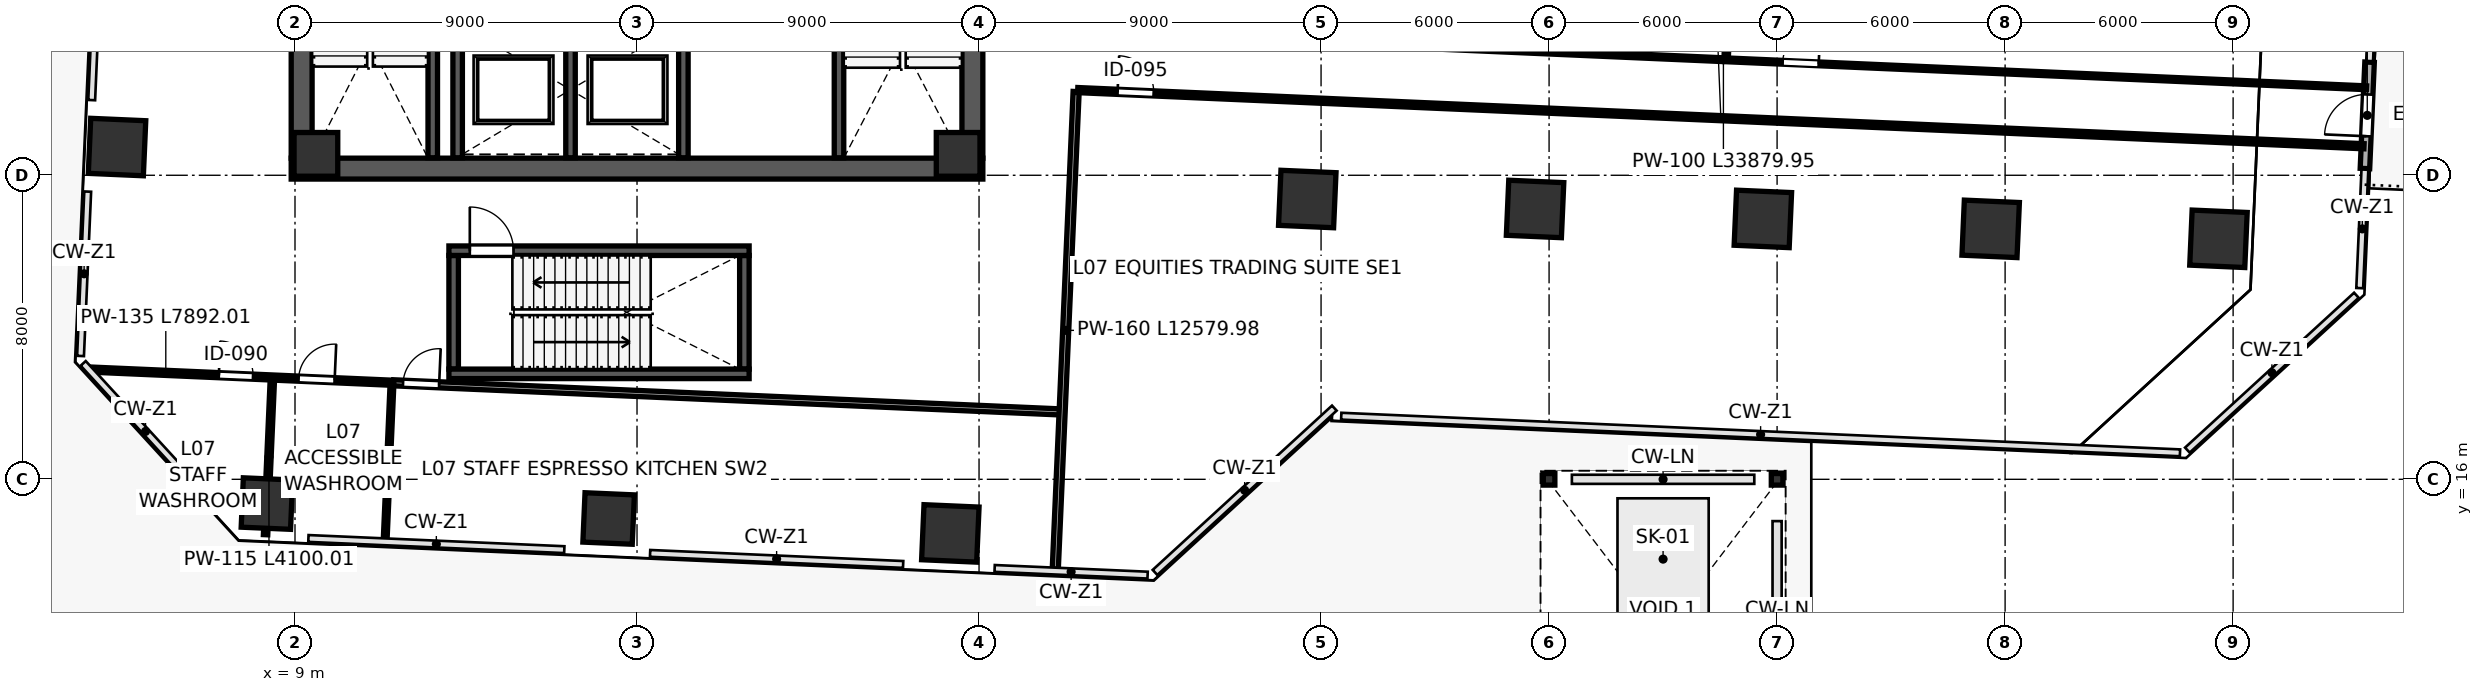
"""IFC4 building model, lengths in metres.
Left out: names, types, materials, properties, quantities, classifications, styles, units other than length and angle.
Written with IfcOpenShell. Run it as: python <this file> out.ifc"""

import sys

from ifc_helpers import new_model, si_unit, direction, frame, frame_2d, origin, origin_2d, place, context, subcontext, project, spatial, rectangle, hollow_rectangle, extrude, source, transform, mapped, element, fill, save


model = new_model("IFC4")
c1 = context("Model", 3, precision=1e-05, world=origin(), true_north=direction((0.0, 1.0)))
c2 = subcontext(c1, "Body", "Model", "MODEL_VIEW")
j1 = project(units=[si_unit("LENGTHUNIT", "METRE"), si_unit("PLANEANGLEUNIT", "RADIAN")], contexts=[c1])
p1 = place(None, origin())
s1 = spatial("IfcSite", under=j1, at=p1, CompositionType="ELEMENT")
p2 = place(p1, origin())
s2 = spatial("IfcBuilding", under=s1, at=p2, CompositionType="ELEMENT")
p3 = place(p2, frame((0.0, 0.0, 32.8)))
s3 = spatial("IfcBuildingStorey", under=s2, at=p3, CompositionType="ELEMENT", Elevation=32.8)
m1 = source(origin(), c2, "Body", "SweptSolid", [
    extrude(rectangle(XDim=1.15, YDim=1.15, at=origin_2d()), origin(), (0.0, 0.0, 1.0), 4.799),
])
for number, where, z_axis, x_axis in (
    (1, (9.55, 24.55, 0.001), (0.0, 0.0, 1.0), (1.0, 0.0, 0.0)),
    (2, (26.45, 24.55, 0.001), (0.0, 0.0, 1.0), (1.0, 0.0, 0.0)),
):
    element("IfcColumn", number, at=place(p3, frame(where, z_axis=z_axis, x_axis=x_axis)), inside=s3, PredefinedType="COLUMN", context=c2, shape_type="MappedRepresentation", body=[
        mapped(m1, transform((0.0, 0.0, 0.0), scale=1.0)),
    ])
m2 = source(origin(), c2, "Body", "SweptSolid", [
    extrude(rectangle(XDim=1.3, YDim=1.3, at=origin_2d()), origin(), (0.0, 0.0, 1.0), 4.799),
])
for number, where, z_axis, x_axis in (
    (3, (8.262, 15.362, 0.001), (0.0, 0.0, 1.0), (-0.999, 0.044, 0.0)),
    (4, (17.253, 14.969, 0.001), (0.0, 0.0, 1.0), (-0.999, 0.044, 0.0)),
):
    element("IfcColumn", number, at=place(p3, frame(where, z_axis=z_axis, x_axis=x_axis)), inside=s3, PredefinedType="COLUMN", context=c2, shape_type="MappedRepresentation", body=[
        mapped(m2, transform((0.0, 0.0, 0.0), scale=1.0)),
    ])
m3 = source(origin(), c2, "Body", "SweptSolid", [
    extrude(rectangle(XDim=1.45, YDim=1.45, at=origin_2d()), origin(), (0.0, 0.0, 1.0), 4.799),
])
p4 = place(p3, frame((26.244, 14.576, 0.001), z_axis=(0.0, 0.0, 1.0), x_axis=(-0.999048221582, 0.043619387365, 0.0)))
e5 = element("IfcColumn", 5, at=p4, inside=s3, PredefinedType="COLUMN", context=c2, shape_type="MappedRepresentation", body=[
    mapped(m3, transform((0.0, 0.0, 0.0), scale=1.0)),
])
m4 = source(origin(), c2, "Body", "SweptSolid", [
    extrude(rectangle(XDim=1.45, YDim=1.45, at=origin_2d()), origin(), (0.0, 0.0, 1.0), 4.799),
])
for number, where, z_axis, x_axis in (
    (6, (35.637, 23.375, 0.001), (0.0, 0.0, 1.0), (-0.999, 0.044, 0.0)),
    (7, (41.632, 23.113, 0.001), (0.0, 0.0, 1.0), (-0.999, 0.044, 0.0)),
    (8, (47.626, 22.852, 0.001), (0.0, 0.0, 1.0), (-0.999, 0.044, 0.0)),
    (9, (53.62, 22.59, 0.001), (0.0, 0.0, 1.0), (-0.999, 0.044, 0.0)),
):
    element("IfcColumn", number, at=place(p3, frame(where, z_axis=z_axis, x_axis=x_axis)), inside=s3, PredefinedType="COLUMN", context=c2, shape_type="MappedRepresentation", body=[
        mapped(m4, transform((0.0, 0.0, 0.0), scale=1.0)),
    ])
for number, where, z_axis, x_axis in (
    (10, (59.615, 22.328, 0.001), (0.0, 0.0, 1.0), (-0.999, 0.044, 0.0)),
    (11, (4.317, 24.743, 0.001), (0.0, 0.0, 1.0), (-0.999, 0.044, 0.0)),
):
    element("IfcColumn", number, at=place(p3, frame(where, z_axis=z_axis, x_axis=x_axis)), inside=s3, PredefinedType="COLUMN", context=c2, shape_type="MappedRepresentation", body=[
        mapped(m3, transform((0.0, 0.0, 0.0), scale=1.0)),
    ])
m5 = source(origin(), c2, "Body", "SweptSolid", [
    extrude(hollow_rectangle(XDim=0.305, YDim=0.305, WallThickness=0.016, InnerFilletRadius=0.016, OuterFilletRadius=0.032, at=origin_2d()), origin(), (0.0, 0.0, 1.0), 3.999),
])
for number, where, z_axis, x_axis in (
    (12, (48.0, 16.0, 0.001), (0.0, 0.0, 1.0), (1.0, 0.0, 0.0)),
    (13, (42.0, 16.0, 0.001), (0.0, 0.0, 1.0), (1.0, 0.0, 0.0)),
):
    element("IfcColumn", number, at=place(p3, frame(where, z_axis=z_axis, x_axis=x_axis)), inside=s3, PredefinedType="USERDEFINED", context=c2, shape_type="MappedRepresentation", body=[
        mapped(m5, transform((0.0, 0.0, 0.0), scale=1.0)),
    ])
p5 = place(p3, frame((63.469, 24.178, 0.0), z_axis=(0.0, 0.0, 1.0), x_axis=(0.04359614401, 0.999049236138, 0.0)))
e14 = element("IfcWall", 14, at=p5, inside=s3, PredefinedType="SOLIDWALL", context=c2, shape_type="SweptSolid", body=[
    extrude(rectangle(XDim=2.8, YDim=0.25, at=frame_2d((1.4, 0.0))), origin(), (0.0, 0.0, 1.0), 4.56),
])
p6 = place(p5, frame((0.85, 0.0, 0.0)))
e15 = element("IfcOpeningElement", 15, at=p6, cuts=e14, PredefinedType="OPENING", context=c2, shape_type="SweptSolid", body=[
    extrude(rectangle(XDim=1.1, YDim=2.2, at=frame_2d((0.55, 1.1))), frame((0.0, 0.135, 0.0), z_axis=(0.0, -1.0, 0.0), x_axis=(1.0, 0.0, 0.0)), (0.0, 0.0, 1.0), 0.27),
])
p7 = place(p3, frame((9.175, 24.45, 0.0), z_axis=(0.0, 0.0, 1.0), x_axis=(0.0, 1.0, 0.0)))
e16 = element("IfcWall", 16, at=p7, inside=s3, PredefinedType="SHEAR", context=c2, shape_type="SweptSolid", body=[
    extrude(rectangle(XDim=15.1, YDim=0.55, at=frame_2d((7.55, 0.0))), origin(), (0.0, 0.0, 1.0), 4.56),
])
p8 = place(p3, frame((26.825, 24.45, 0.0), z_axis=(0.0, 0.0, 1.0), x_axis=(0.0, 1.0, 0.0)))
e17 = element("IfcWall", 17, at=p8, inside=s3, PredefinedType="SHEAR", context=c2, shape_type="SweptSolid", body=[
    extrude(rectangle(XDim=15.1, YDim=0.55, at=frame_2d((7.55, 0.0))), origin(), (0.0, 0.0, 1.0), 4.56),
])
p9 = place(p8, frame((8.6, 0.0, 0.0)))
e18 = element("IfcOpeningElement", 18, at=p9, cuts=e17, PredefinedType="OPENING", context=c2, shape_type="SweptSolid", body=[
    extrude(rectangle(XDim=1.15, YDim=2.2, at=frame_2d((0.575, 1.1))), frame((0.0, 0.285, 0.0), z_axis=(0.0, -1.0, 0.0), x_axis=(1.0, 0.0, 0.0)), (0.0, 0.0, 1.0), 0.57),
])
p10 = place(p3, frame((8.9, 24.175, 0.0), z_axis=(0.0, 0.0, 1.0), x_axis=(1.0, 0.0, 0.0)))
e19 = element("IfcWall", 19, at=p10, inside=s3, PredefinedType="SHEAR", context=c2, shape_type="SweptSolid", body=[
    extrude(rectangle(XDim=18.2, YDim=0.55, at=frame_2d((9.1, 0.0))), origin(), (0.0, 0.0, 1.0), 4.56),
])
p11 = place(p3, frame((12.625, 24.46, 0.0), z_axis=(0.0, 0.0, 1.0), x_axis=(0.0, 1.0, 0.0)))
e20 = element("IfcWall", 20, at=p11, inside=s3, PredefinedType="SHEAR", context=c2, shape_type="SweptSolid", body=[
    extrude(rectangle(XDim=7.49, YDim=0.25, at=frame_2d((3.745, 0.0))), origin(), (0.0, 0.0, 1.0), 4.56),
])
p12 = place(p11, frame((5.85, 0.0, 0.0)))
e21 = element("IfcOpeningElement", 21, at=p12, cuts=e20, PredefinedType="OPENING", context=c2, shape_type="SweptSolid", body=[
    extrude(rectangle(XDim=1.15, YDim=2.2, at=frame_2d((0.575, 1.1))), frame((0.0, 0.135, 0.0), z_axis=(0.0, -1.0, 0.0), x_axis=(1.0, 0.0, 0.0)), (0.0, 0.0, 1.0), 0.27),
])
p13 = place(p3, frame((23.315, 24.46, 0.0), z_axis=(0.0, 0.0, 1.0), x_axis=(0.0, 1.0, 0.0)))
e22 = element("IfcWall", 22, at=p13, inside=s3, PredefinedType="SHEAR", context=c2, shape_type="SweptSolid", body=[
    extrude(rectangle(XDim=7.49, YDim=0.25, at=frame_2d((3.745, 0.0))), origin(), (0.0, 0.0, 1.0), 4.56),
])
for number, where, z_axis, x_axis in (
    (23, (13.28, 24.46, 0.0), (0.0, 0.0, 1.0), (0.0, 1.0, 0.0)),
    (24, (16.25, 24.46, 0.0), (0.0, 0.0, 1.0), (0.0, 1.0, 0.0)),
    (25, (19.22, 24.46, 0.0), (0.0, 0.0, 1.0), (0.0, 1.0, 0.0)),
):
    element("IfcWall", number, at=place(p3, frame(where, z_axis=z_axis, x_axis=x_axis)), inside=s3, PredefinedType="SHEAR", context=c2, shape_type="SweptSolid", body=[
        extrude(rectangle(XDim=3.49, YDim=0.25, at=frame_2d((1.745, 0.0))), origin(), (0.0, 0.0, 1.0), 4.56),
    ])
for number, where, z_axis, x_axis in (
    (26, (13.175, 18.9, 0.0), (0.0, 0.0, 1.0), (0.0, 1.0, 0.0)),
    (27, (20.825, 18.9, 0.0), (0.0, 0.0, 1.0), (0.0, 1.0, 0.0)),
):
    element("IfcWall", number, at=place(p3, frame(where, z_axis=z_axis, x_axis=x_axis)), inside=s3, PredefinedType="SHEAR", context=c2, shape_type="SweptSolid", body=[
        extrude(rectangle(XDim=2.99, YDim=0.25, at=frame_2d((1.495, 0.0))), origin(), (0.0, 0.0, 1.0), 4.56),
    ])
p14 = place(p3, frame((13.05, 18.775, 0.0), z_axis=(0.0, 0.0, 1.0), x_axis=(1.0, 0.0, 0.0)))
e28 = element("IfcWall", 28, at=p14, inside=s3, PredefinedType="SHEAR", context=c2, shape_type="SweptSolid", body=[
    extrude(rectangle(XDim=7.9, YDim=0.25, at=frame_2d((3.95, 0.0))), origin(), (0.0, 0.0, 1.0), 4.56),
])
p15 = place(p3, frame((13.05, 22.015, 0.0), z_axis=(0.0, 0.0, 1.0), x_axis=(1.0, 0.0, 0.0)))
e29 = element("IfcWall", 29, at=p15, inside=s3, PredefinedType="SHEAR", context=c2, shape_type="SweptSolid", body=[
    extrude(rectangle(XDim=7.9, YDim=0.25, at=frame_2d((3.95, 0.0))), origin(), (0.0, 0.0, 1.0), 4.56),
])
p16 = place(p15, frame((0.55, 0.0, 0.0)))
e30 = element("IfcOpeningElement", 30, at=p16, cuts=e29, PredefinedType="OPENING", context=c2, shape_type="SweptSolid", body=[
    extrude(rectangle(XDim=1.15, YDim=2.2, at=frame_2d((0.575, 1.1))), frame((0.0, 0.135, 0.0), z_axis=(0.0, -1.0, 0.0), x_axis=(1.0, 0.0, 0.0)), (0.0, 0.0, 1.0), 0.27),
])
p17 = place(p3, frame((8.226, 14.542, 0.0), z_axis=(0.0, 0.0, 1.0), x_axis=(0.043649126443, 0.999046922702, 0.0)))
e31 = element("IfcWall", 31, at=p17, inside=s3, PredefinedType="PARTITIONING", context=c2, shape_type="SweptSolid", body=[
    extrude(rectangle(XDim=4.1, YDim=0.115, at=frame_2d((2.05, 0.0))), origin(), (0.0, 0.0, 1.0), 3.695),
])
p18 = place(p3, frame((11.373, 14.405, 0.0), z_axis=(0.0, 0.0, 1.0), x_axis=(0.04364652983, 0.999047036147, 0.0)))
e32 = element("IfcWall", 32, at=p18, inside=s3, PredefinedType="PARTITIONING", context=c2, shape_type="SweptSolid", body=[
    extrude(rectangle(XDim=4.1, YDim=0.1, at=frame_2d((2.05, 0.0))), origin(), (0.0, 0.0, 1.0), 3.695),
])
p19 = place(p3, frame((3.629, 18.887, 0.0), z_axis=(0.0, 0.0, 1.0), x_axis=(0.999046913697, -0.043649332566, 0.0)))
e33 = element("IfcWall", 33, at=p19, inside=s3, PredefinedType="PARTITIONING", context=c2, shape_type="SweptSolid", body=[
    extrude(rectangle(XDim=7.892, YDim=0.135, at=frame_2d((3.946, 0.0))), origin(), (0.0, 0.0, 1.0), 4.56),
])
p20 = place(p19, frame((3.37, 0.0, 0.0)))
e34 = element("IfcOpeningElement", 34, at=p20, cuts=e33, PredefinedType="OPENING", context=c2, shape_type="SweptSolid", body=[
    extrude(rectangle(XDim=0.9, YDim=2.15, at=frame_2d((0.45, 1.075))), frame((0.0, 0.078, 0.0), z_axis=(0.0, -1.0, 0.0), x_axis=(1.0, 0.0, 0.0)), (0.0, 0.0, 1.0), 0.155),
])
p21 = place(p19, frame((5.47, 0.0, 0.0)))
e35 = element("IfcOpeningElement", 35, at=p21, cuts=e33, PredefinedType="OPENING", context=c2, shape_type="SweptSolid", body=[
    extrude(rectangle(XDim=0.95, YDim=2.15, at=frame_2d((0.475, 1.075))), frame((0.0, 0.078, 0.0), z_axis=(0.0, -1.0, 0.0), x_axis=(1.0, 0.0, 0.0)), (0.0, 0.0, 1.0), 0.155),
])
p22 = place(p3, frame((11.594, 18.539, 0.0), z_axis=(0.0, 0.0, 1.0), x_axis=(0.999048303008, -0.043617522367, 0.0)))
e36 = element("IfcWall", 36, at=p22, inside=s3, PredefinedType="PARTITIONING", context=c2, shape_type="SweptSolid", body=[
    extrude(rectangle(XDim=17.57, YDim=0.16, at=frame_2d((8.785, 0.0))), origin(), (0.0, 0.0, 1.0), 4.56),
])
p23 = place(p22, frame((0.25, 0.0, 0.0)))
e37 = element("IfcOpeningElement", 37, at=p23, cuts=e36, PredefinedType="OPENING", context=c2, shape_type="SweptSolid", body=[
    extrude(rectangle(XDim=0.95, YDim=2.15, at=frame_2d((0.475, 1.075))), frame((0.0, 0.09, 0.0), z_axis=(0.0, -1.0, 0.0), x_axis=(1.0, 0.0, 0.0)), (0.0, 0.0, 1.0), 0.18),
])
p24 = place(p3, frame((29.006, 13.635, 0.0), z_axis=(0.0, 0.0, 1.0), x_axis=(0.043626715414, 0.999047901605, 0.0)))
e38 = element("IfcWall", 38, at=p24, inside=s3, PredefinedType="PARTITIONING", context=c2, shape_type="SweptSolid", body=[
    extrude(rectangle(XDim=12.58, YDim=0.16, at=frame_2d((6.29, 0.0))), origin(), (0.0, 0.0, 1.0), 4.56),
])
p25 = place(p3, frame((29.664, 27.78, 0.0), z_axis=(0.0, 0.0, 1.0), x_axis=(0.999048269666, -0.043618286038, 0.0)))
e39 = element("IfcWall", 39, at=p25, inside=s3, PredefinedType="PARTITIONING", context=c2, shape_type="SweptSolid", body=[
    extrude(rectangle(XDim=33.88, YDim=0.1, at=frame_2d((16.94, 0.0))), origin(), (0.0, 0.0, 1.0), 3.695),
])
p26 = place(p25, frame((1.05, 0.0, 0.0)))
e40 = element("IfcOpeningElement", 40, at=p26, cuts=e39, PredefinedType="OPENING", context=c2, shape_type="SweptSolid", body=[
    extrude(rectangle(XDim=0.95, YDim=2.15, at=frame_2d((0.475, 1.075))), frame((0.0, 0.06, 0.0), z_axis=(0.0, -1.0, 0.0), x_axis=(1.0, 0.0, 0.0)), (0.0, 0.0, 1.0), 0.12),
])
p27 = place(p25, frame((18.5, 0.0, 0.0)))
e41 = element("IfcOpeningElement", 41, at=p27, cuts=e39, PredefinedType="OPENING", context=c2, shape_type="SweptSolid", body=[
    extrude(rectangle(XDim=0.95, YDim=2.15, at=frame_2d((0.475, 1.075))), frame((0.0, 0.06, 0.0), z_axis=(0.0, -1.0, 0.0), x_axis=(1.0, 0.0, 0.0)), (0.0, 0.0, 1.0), 0.12),
])
p28 = place(p3, frame((29.597, 26.241, 0.0), z_axis=(0.0, 0.0, 1.0), x_axis=(0.999047941909, -0.043625792456, 0.0)))
e42 = element("IfcWall", 42, at=p28, inside=s3, PredefinedType="PARTITIONING", context=c2, shape_type="SweptSolid", body=[
    extrude(rectangle(XDim=33.88, YDim=0.135, at=frame_2d((16.94, 0.0))), origin(), (0.0, 0.0, 1.0), 3.695),
])
p29 = place(p28, frame((1.05, 0.0, 0.0)))
e43 = element("IfcOpeningElement", 43, at=p29, cuts=e42, PredefinedType="OPENING", context=c2, shape_type="SweptSolid", body=[
    extrude(rectangle(XDim=0.95, YDim=2.15, at=frame_2d((0.475, 1.075))), frame((0.0, 0.078, 0.0), z_axis=(0.0, -1.0, 0.0), x_axis=(1.0, 0.0, 0.0)), (0.0, 0.0, 1.0), 0.155),
])
p30 = place(p3, frame((46.659, 27.078, 0.0), z_axis=(0.0, 0.0, 1.0), x_axis=(0.043623060059, 0.999048061222, 0.0)))
e44 = element("IfcWall", 44, at=p30, inside=s3, PredefinedType="PARTITIONING", context=c2, shape_type="SweptSolid", body=[
    extrude(rectangle(XDim=19.84, YDim=0.115, at=frame_2d((9.92, 0.0))), origin(), (0.0, 0.0, 1.0), 3.923),
])
m6 = source(origin(), c2, "Body", "SweptSolid", [
    extrude(rectangle(XDim=1.1, YDim=2.2, at=frame_2d((0.55, 1.1))), frame((0.0, 0.025, 0.0), z_axis=(0.0, -1.0, 0.0), x_axis=(1.0, 0.0, 0.0)), (0.0, 0.0, 1.0), 0.05),
])
p31 = place(p6, origin())
e45 = element("IfcDoor", 45, at=p31, inside=s3, OperationType="SINGLE_SWING_LEFT", PredefinedType="DOOR", context=c2, shape_type="MappedRepresentation", body=[
    mapped(m6, transform((0.0, 0.0, 0.0), scale=1.0)),
])
fill(e15, e45)
p32 = place(p3, frame((0.0, 0.0, 3.94)))
p33 = place(p32, frame((45.0, 13.9, 0.21)))
e46 = element("IfcWindow", 46, at=p33, inside=s3, PartitioningType="SINGLE_PANEL", PredefinedType="SKYLIGHT", context=c2, shape_type="SweptSolid", body=[
    extrude(rectangle(XDim=2.4, YDim=3.2, at=origin_2d()), origin(), (0.0, 0.0, 1.0), 0.05),
])
m7 = source(origin(), c2, "Body", "SweptSolid", [
    extrude(rectangle(XDim=1.15, YDim=2.2, at=frame_2d((0.575, 1.1))), frame((0.0, 0.025, 0.0), z_axis=(0.0, -1.0, 0.0), x_axis=(1.0, 0.0, 0.0)), (0.0, 0.0, 1.0), 0.05),
])
p34 = place(p16, origin())
e47 = element("IfcDoor", 47, at=p34, inside=s3, OperationType="SINGLE_SWING_LEFT", PredefinedType="DOOR", context=c2, shape_type="MappedRepresentation", body=[
    mapped(m7, transform((0.0, 0.0, 0.0), scale=1.0)),
])
fill(e30, e47)
m8 = source(origin(), c2, "Body", "SweptSolid", [
    extrude(rectangle(XDim=0.9, YDim=2.15, at=frame_2d((0.45, 1.075))), frame((0.0, 0.025, 0.0), z_axis=(0.0, -1.0, 0.0), x_axis=(1.0, 0.0, 0.0)), (0.0, 0.0, 1.0), 0.05),
])
p35 = place(p20, origin())
e48 = element("IfcDoor", 48, at=p35, inside=s3, OperationType="SINGLE_SWING_LEFT", PredefinedType="DOOR", context=c2, shape_type="MappedRepresentation", body=[
    mapped(m8, transform((0.0, 0.0, 0.0), scale=1.0)),
])
fill(e34, e48)
m9 = source(origin(), c2, "Body", "SweptSolid", [
    extrude(rectangle(XDim=0.95, YDim=2.15, at=frame_2d((0.475, 1.075))), frame((0.0, 0.025, 0.0), z_axis=(0.0, -1.0, 0.0), x_axis=(1.0, 0.0, 0.0)), (0.0, 0.0, 1.0), 0.05),
])
p36 = place(p21, origin())
e49 = element("IfcDoor", 49, at=p36, inside=s3, OperationType="SINGLE_SWING_RIGHT", PredefinedType="DOOR", context=c2, shape_type="MappedRepresentation", body=[
    mapped(m9, transform((0.0, 0.0, 0.0), scale=1.0)),
])
fill(e35, e49)
m10 = source(origin(), c2, "Body", "SweptSolid", [
    extrude(rectangle(XDim=0.95, YDim=2.15, at=frame_2d((0.475, 1.075))), frame((0.0, 0.025, 0.0), z_axis=(0.0, -1.0, 0.0), x_axis=(1.0, 0.0, 0.0)), (0.0, 0.0, 1.0), 0.05),
])
p37 = place(p23, origin())
e50 = element("IfcDoor", 50, at=p37, inside=s3, OperationType="SINGLE_SWING_RIGHT", PredefinedType="DOOR", context=c2, shape_type="MappedRepresentation", body=[
    mapped(m10, transform((0.0, 0.0, 0.0), scale=1.0)),
])
fill(e37, e50)
p38 = place(p27, origin())
e51 = element("IfcDoor", 51, at=p38, inside=s3, OperationType="SINGLE_SWING_RIGHT", PredefinedType="DOOR", context=c2, shape_type="MappedRepresentation", body=[
    mapped(m9, transform((0.0, 0.0, 0.0), scale=1.0)),
])
fill(e41, e51)
p39 = place(p29, origin())
e52 = element("IfcDoor", 52, at=p39, inside=s3, OperationType="SINGLE_SWING_LEFT", PredefinedType="DOOR", context=c2, shape_type="MappedRepresentation", body=[
    mapped(m9, transform((0.0, 0.0, 0.0), scale=1.0)),
])
fill(e43, e52)
save(model, sys.argv[1])
